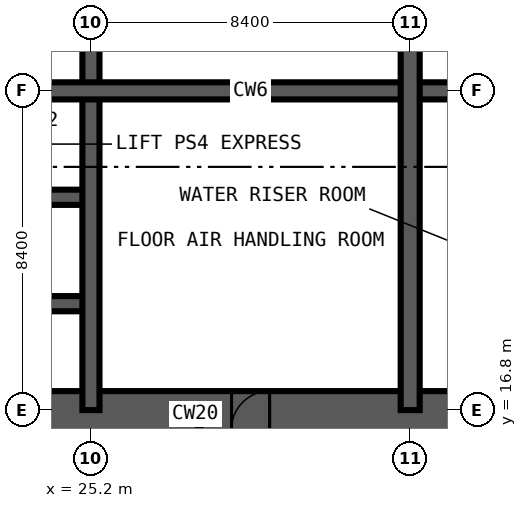
"""IFC4 building model, lengths in metres.
Left out: names, types, materials, properties, quantities, classifications, styles, units other than length and angle.
Written with IfcOpenShell. Run it as: python <this file> out.ifc"""

import sys

from ifc_helpers import new_model, si_unit, direction, frame, frame_2d, origin, place, context, subcontext, project, spatial, rectangle, extrude, element, fill, save


model = new_model("IFC4")
c1 = context("Model", 3, precision=1e-05, world=origin(), true_north=direction((0.0, 1.0)))
c2 = subcontext(c1, "Body", "Model", "MODEL_VIEW")
j1 = project(units=[si_unit("LENGTHUNIT", "METRE"), si_unit("PLANEANGLEUNIT", "RADIAN")], contexts=[c1])
p1 = place(None, origin())
s1 = spatial("IfcSite", under=j1, at=p1, CompositionType="ELEMENT")
p2 = place(p1, origin())
s2 = spatial("IfcBuilding", under=s1, at=p2, CompositionType="ELEMENT")
p3 = place(p2, frame((0.0, 0.0, 17.0)))
s3 = spatial("IfcBuildingStorey", under=s2, at=p3, CompositionType="ELEMENT", Elevation=17.0)
p4 = place(p3, frame((15.3, 16.3, -0.3), z_axis=(0.0, 0.0, 1.0), x_axis=(1.0, 0.0, 0.0)))
e1 = element("IfcWall", 1, at=p4, inside=s3, PredefinedType="SHEAR", context=c2, shape_type="SweptSolid", body=[
    extrude(rectangle(XDim=28.2, YDim=2.0, at=frame_2d((14.1, 0.0))), origin(), (0.0, 0.0, 1.0), 4.95),
])
p5 = place(p4, frame((13.6, 0.0, 0.3)))
e2 = element("IfcOpeningElement", 2, at=p5, cuts=e1, PredefinedType="OPENING", context=c2, shape_type="SweptSolid", body=[
    extrude(rectangle(XDim=1.0, YDim=2.1, at=frame_2d((0.5, 1.05))), frame((0.0, 1.01, 0.0), z_axis=(0.0, -1.0, 0.0), x_axis=(1.0, 0.0, 0.0)), (0.0, 0.0, 1.0), 2.02),
])
p6 = place(p4, frame((19.9, 0.0, 0.3)))
e3 = element("IfcOpeningElement", 3, at=p6, cuts=e1, PredefinedType="OPENING", context=c2, shape_type="SweptSolid", body=[
    extrude(rectangle(XDim=1.0, YDim=2.1, at=frame_2d((0.5, 1.05))), frame((0.0, 1.01, 0.0), z_axis=(0.0, -1.0, 0.0), x_axis=(1.0, 0.0, 0.0)), (0.0, 0.0, 1.0), 2.02),
])
for number, where, z_axis, x_axis in (
    (4, (16.8, 19.6, -0.3), (0.0, 0.0, 1.0), (1.0, 0.0, 0.0)),
    (5, (16.8, 22.4, -0.3), (0.0, 0.0, 1.0), (1.0, 0.0, 0.0)),
):
    element("IfcWall", number, at=place(p3, frame(where, z_axis=z_axis, x_axis=x_axis)), inside=s3, PredefinedType="SHEAR", context=c2, shape_type="SweptSolid", body=[
        extrude(rectangle(XDim=8.4, YDim=0.4, at=frame_2d((4.2, 0.0))), origin(), (0.0, 0.0, 1.0), 4.95),
    ])
for number, where, z_axis, x_axis in (
    (6, (25.2, 16.8, -0.3), (0.0, 0.0, 1.0), (0.0, 1.0, 0.0)),
    (7, (16.8, 25.2, -0.3), (0.0, 0.0, 1.0), (1.0, 0.0, 0.0)),
):
    element("IfcWall", number, at=place(p3, frame(where, z_axis=z_axis, x_axis=x_axis)), inside=s3, PredefinedType="SHEAR", context=c2, shape_type="SweptSolid", body=[
        extrude(rectangle(XDim=25.2, YDim=0.45, at=frame_2d((12.6, 0.0))), origin(), (0.0, 0.0, 1.0), 4.95),
    ])
p7 = place(p3, frame((33.6, 16.8, -0.3), z_axis=(0.0, 0.0, 1.0), x_axis=(0.0, 1.0, 0.0)))
e8 = element("IfcWall", 8, at=p7, inside=s3, PredefinedType="SHEAR", context=c2, shape_type="SweptSolid", body=[
    extrude(rectangle(XDim=25.2, YDim=0.5, at=frame_2d((12.6, 0.0))), origin(), (0.0, 0.0, 1.0), 4.95),
])
p8 = place(p7, frame((22.5, 0.0, 0.3)))
e9 = element("IfcOpeningElement", 9, at=p8, cuts=e8, PredefinedType="OPENING", context=c2, shape_type="SweptSolid", body=[
    extrude(rectangle(XDim=1.2, YDim=2.2, at=frame_2d((0.6, 1.1))), frame((0.0, 0.26, 0.0), z_axis=(0.0, -1.0, 0.0), x_axis=(1.0, 0.0, 0.0)), (0.0, 0.0, 1.0), 0.52),
])
p9 = place(p7, frame((18.3, 0.0, 0.3)))
e10 = element("IfcOpeningElement", 10, at=p9, cuts=e8, PredefinedType="OPENING", context=c2, shape_type="SweptSolid", body=[
    extrude(rectangle(XDim=1.2, YDim=2.2, at=frame_2d((0.6, 1.1))), frame((0.0, 0.26, 0.0), z_axis=(0.0, -1.0, 0.0), x_axis=(1.0, 0.0, 0.0)), (0.0, 0.0, 1.0), 0.52),
])
p10 = place(p7, frame((12.1, 0.0, 0.3)))
e11 = element("IfcOpeningElement", 11, at=p10, cuts=e8, PredefinedType="OPENING", context=c2, shape_type="SweptSolid", body=[
    extrude(rectangle(XDim=1.0, YDim=2.1, at=frame_2d((0.5, 1.05))), frame((0.0, 0.26, 0.0), z_axis=(0.0, -1.0, 0.0), x_axis=(1.0, 0.0, 0.0)), (0.0, 0.0, 1.0), 0.52),
])
p11 = place(p5, origin())
e12 = element("IfcDoor", 12, at=p11, inside=s3, OperationType="SINGLE_SWING_RIGHT", PredefinedType="DOOR", context=c2, shape_type="SweptSolid", body=[
    extrude(rectangle(XDim=1.0, YDim=2.1, at=frame_2d((0.5, 1.05))), frame((0.0, 0.025, 0.0), z_axis=(0.0, -1.0, 0.0), x_axis=(1.0, 0.0, 0.0)), (0.0, 0.0, 1.0), 0.05),
])
fill(e2, e12)
save(model, sys.argv[1])
